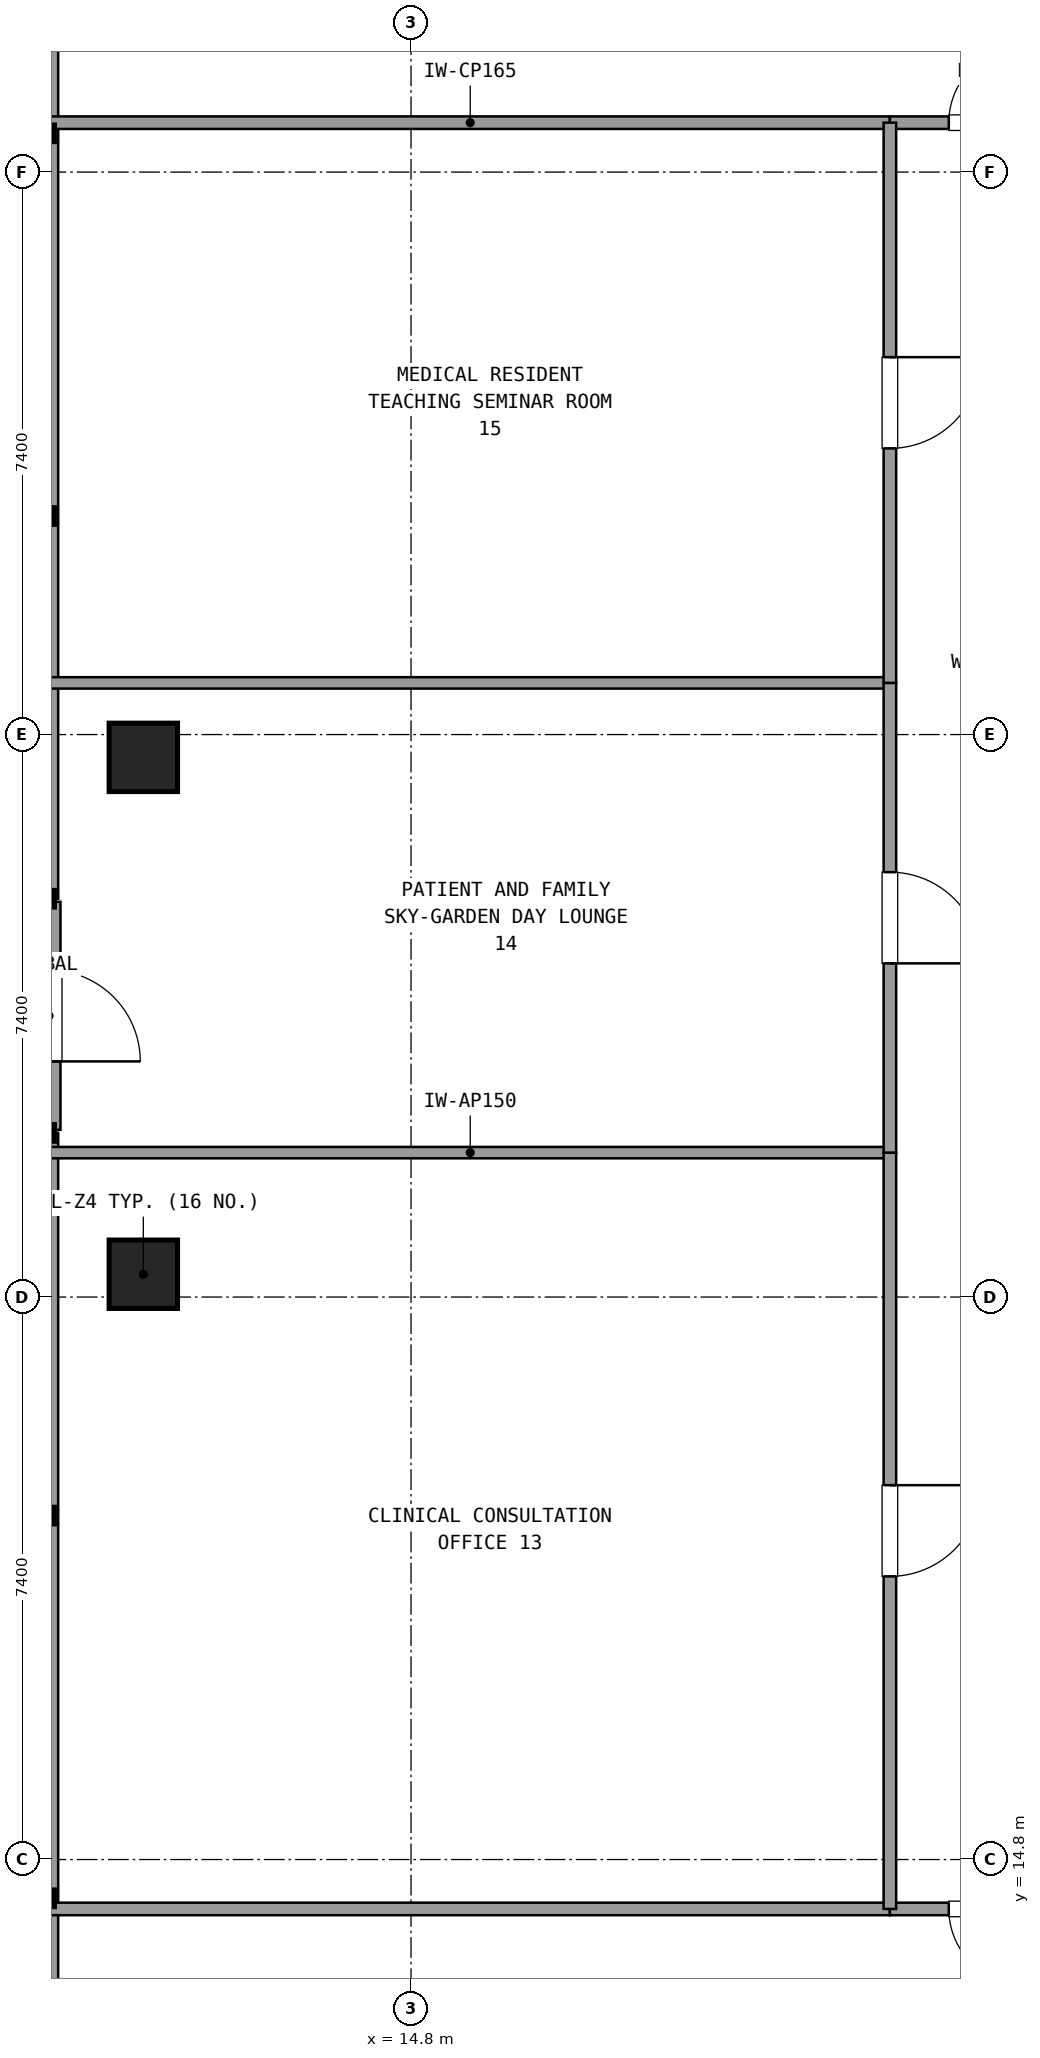
"""IFC4 building model, lengths in metres.
Left out: names, types, materials, properties, quantities, classifications, styles, units other than length and angle.
Written with IfcOpenShell. Run it as: python <this file> out.ifc"""

import sys

from ifc_helpers import new_model, si_unit, direction, frame, frame_2d, origin, origin_2d, place, context, subcontext, project, spatial, rectangle, extrude, element, fill, save


model = new_model("IFC4")
c1 = context("Model", 3, precision=1e-05, world=origin(), true_north=direction((0.0, 1.0)))
c2 = subcontext(c1, "Body", "Model", "MODEL_VIEW")
j1 = project(units=[si_unit("LENGTHUNIT", "METRE"), si_unit("PLANEANGLEUNIT", "RADIAN")], contexts=[c1])
p1 = place(None, origin())
s1 = spatial("IfcSite", under=j1, at=p1, CompositionType="ELEMENT")
p2 = place(p1, origin())
s2 = spatial("IfcBuilding", under=s1, at=p2, CompositionType="ELEMENT")
p3 = place(p2, frame((0.0, 0.0, 228.78)))
s3 = spatial("IfcBuildingStorey", under=s2, at=p3, CompositionType="ELEMENT", Elevation=228.78)
for number, where, z_axis, x_axis in (
    (1, (11.278, 22.5, 0.0), (0.0, 0.0, 1.0), (1.0, 0.0, 0.0)),
    (2, (11.278, 29.3, 0.0), (0.0, 0.0, 1.0), (1.0, 0.0, 0.0)),
):
    element("IfcColumn", number, at=place(p3, frame(where, z_axis=z_axis, x_axis=x_axis)), inside=s3, PredefinedType="COLUMN", context=c2, shape_type="SweptSolid", body=[
        extrude(rectangle(XDim=0.9, YDim=0.9, at=origin_2d()), origin(), (0.0, 0.0, 1.0), 3.6),
    ])
p4 = place(p3, frame((10.038, 27.4, 0.0), z_axis=(0.0, 0.0, 1.0), x_axis=(0.0, -1.0, 0.0)))
e3 = element("IfcWall", 3, at=p4, inside=s3, PredefinedType="SOLIDWALL", context=c2, shape_type="SweptSolid", body=[
    extrude(rectangle(XDim=3.0, YDim=0.3, at=frame_2d((1.5, 0.0))), origin(), (0.0, 0.0, 1.0), 2.67),
])
p5 = place(p4, frame((0.9, 0.0, 0.0)))
e4 = element("IfcOpeningElement", 4, at=p5, cuts=e3, PredefinedType="OPENING", context=c2, shape_type="SweptSolid", body=[
    extrude(rectangle(XDim=1.2, YDim=2.2, at=frame_2d((0.6, 1.1))), frame((0.0, 0.16, 0.0), z_axis=(0.0, -1.0, 0.0), x_axis=(1.0, 0.0, 0.0)), (0.0, 0.0, 1.0), 0.32),
])
p6 = place(p3, frame((10.038, 42.545, 0.0), z_axis=(0.0, 0.0, 1.0), x_axis=(0.0, -1.0, 0.0)))
e5 = element("IfcWall", 5, at=p6, inside=s3, PredefinedType="SOLIDWALL", context=c2, shape_type="SweptSolid", body=[
    extrude(rectangle(XDim=15.105, YDim=0.24, at=frame_2d((7.552, 0.0))), origin(), (0.0, 0.0, 1.0), 0.85),
])
p7 = place(p3, frame((10.038, 24.36, 0.0), z_axis=(0.0, 0.0, 1.0), x_axis=(0.0, -1.0, 0.0)))
e6 = element("IfcWall", 6, at=p7, inside=s3, PredefinedType="SOLIDWALL", context=c2, shape_type="SweptSolid", body=[
    extrude(rectangle(XDim=15.105, YDim=0.24, at=frame_2d((7.553, 0.0))), origin(), (0.0, 0.0, 1.0), 0.85),
])
for number, where, z_axis, x_axis in (
    (7, (10.058, 37.65, 0.0), (0.0, 0.0, 1.0), (1.0, 0.0, 0.0)),
    (8, (10.058, 14.15, 0.0), (0.0, 0.0, 1.0), (1.0, 0.0, 0.0)),
):
    element("IfcWall", number, at=place(p3, frame(where, z_axis=z_axis, x_axis=x_axis)), inside=s3, PredefinedType="PARTITIONING", context=c2, shape_type="SweptSolid", body=[
        extrude(rectangle(XDim=11.042, YDim=0.165, at=frame_2d((5.521, 0.0))), origin(), (0.0, 0.0, 1.0), 2.59),
    ])
p8 = place(p3, frame((21.1, 37.65, 0.0), z_axis=(0.0, 0.0, 1.0), x_axis=(1.0, 0.0, 0.0)))
e9 = element("IfcWall", 9, at=p8, inside=s3, PredefinedType="PARTITIONING", context=c2, shape_type="SweptSolid", body=[
    extrude(rectangle(XDim=2.55, YDim=0.165, at=frame_2d((1.275, 0.0))), origin(), (0.0, 0.0, 1.0), 2.59),
])
p9 = place(p8, frame((0.775, 0.0, 0.0)))
e10 = element("IfcOpeningElement", 10, at=p9, cuts=e9, PredefinedType="OPENING", context=c2, shape_type="SweptSolid", body=[
    extrude(rectangle(XDim=1.0, YDim=2.15, at=frame_2d((0.5, 1.075))), frame((0.0, 0.093, 0.0), z_axis=(0.0, -1.0, 0.0), x_axis=(1.0, 0.0, 0.0)), (0.0, 0.0, 1.0), 0.185),
])
p10 = place(p3, frame((21.1, 14.15, 0.0), z_axis=(0.0, 0.0, 1.0), x_axis=(1.0, 0.0, 0.0)))
e11 = element("IfcWall", 11, at=p10, inside=s3, PredefinedType="PARTITIONING", context=c2, shape_type="SweptSolid", body=[
    extrude(rectangle(XDim=2.55, YDim=0.165, at=frame_2d((1.275, 0.0))), origin(), (0.0, 0.0, 1.0), 2.59),
])
p11 = place(p10, frame((0.775, 0.0, 0.0)))
e12 = element("IfcOpeningElement", 12, at=p11, cuts=e11, PredefinedType="OPENING", context=c2, shape_type="SweptSolid", body=[
    extrude(rectangle(XDim=1.0, YDim=2.15, at=frame_2d((0.5, 1.075))), frame((0.0, 0.093, 0.0), z_axis=(0.0, -1.0, 0.0), x_axis=(1.0, 0.0, 0.0)), (0.0, 0.0, 1.0), 0.185),
])
p12 = place(p3, frame((21.1, 24.1, 0.0), z_axis=(0.0, 0.0, 1.0), x_axis=(-1.0, 0.0, 0.0)))
e13 = element("IfcWall", 13, at=p12, inside=s3, PredefinedType="PARTITIONING", context=c2, shape_type="SweptSolid", body=[
    extrude(rectangle(XDim=11.042, YDim=0.15, at=frame_2d((5.521, 0.0))), origin(), (0.0, 0.0, 1.0), 2.59),
])
p13 = place(p3, frame((21.1, 14.15, 0.0), z_axis=(0.0, 0.0, 1.0), x_axis=(0.0, 1.0, 0.0)))
e14 = element("IfcWall", 14, at=p13, inside=s3, PredefinedType="PARTITIONING", context=c2, shape_type="SweptSolid", body=[
    extrude(rectangle(XDim=9.95, YDim=0.165, at=frame_2d((4.975, 0.0))), origin(), (0.0, 0.0, 1.0), 2.59),
])
p14 = place(p13, frame((4.375, 0.0, 0.0)))
e15 = element("IfcOpeningElement", 15, at=p14, cuts=e14, PredefinedType="OPENING", context=c2, shape_type="SweptSolid", body=[
    extrude(rectangle(XDim=1.2, YDim=2.15, at=frame_2d((0.6, 1.075))), frame((0.0, 0.093, 0.0), z_axis=(0.0, -1.0, 0.0), x_axis=(1.0, 0.0, 0.0)), (0.0, 0.0, 1.0), 0.185),
])
p15 = place(p3, frame((21.1, 30.28, 0.0), z_axis=(0.0, 0.0, 1.0), x_axis=(-1.0, 0.0, 0.0)))
e16 = element("IfcWall", 16, at=p15, inside=s3, PredefinedType="PARTITIONING", context=c2, shape_type="SweptSolid", body=[
    extrude(rectangle(XDim=11.042, YDim=0.15, at=frame_2d((5.521, 0.0))), origin(), (0.0, 0.0, 1.0), 2.59),
])
p16 = place(p3, frame((21.1, 24.1, 0.0), z_axis=(0.0, 0.0, 1.0), x_axis=(0.0, 1.0, 0.0)))
e17 = element("IfcWall", 17, at=p16, inside=s3, PredefinedType="PARTITIONING", context=c2, shape_type="SweptSolid", body=[
    extrude(rectangle(XDim=6.18, YDim=0.165, at=frame_2d((3.09, 0.0))), origin(), (0.0, 0.0, 1.0), 2.59),
])
p17 = place(p16, frame((2.49, 0.0, 0.0)))
e18 = element("IfcOpeningElement", 18, at=p17, cuts=e17, PredefinedType="OPENING", context=c2, shape_type="SweptSolid", body=[
    extrude(rectangle(XDim=1.2, YDim=2.15, at=frame_2d((0.6, 1.075))), frame((0.0, 0.093, 0.0), z_axis=(0.0, -1.0, 0.0), x_axis=(1.0, 0.0, 0.0)), (0.0, 0.0, 1.0), 0.185),
])
p18 = place(p3, frame((21.1, 30.28, 0.0), z_axis=(0.0, 0.0, 1.0), x_axis=(0.0, 1.0, 0.0)))
e19 = element("IfcWall", 19, at=p18, inside=s3, PredefinedType="PARTITIONING", context=c2, shape_type="SweptSolid", body=[
    extrude(rectangle(XDim=7.37, YDim=0.165, at=frame_2d((3.685, 0.0))), origin(), (0.0, 0.0, 1.0), 2.59),
])
p19 = place(p18, frame((3.085, 0.0, 0.0)))
e20 = element("IfcOpeningElement", 20, at=p19, cuts=e19, PredefinedType="OPENING", context=c2, shape_type="SweptSolid", body=[
    extrude(rectangle(XDim=1.2, YDim=2.15, at=frame_2d((0.6, 1.075))), frame((0.0, 0.093, 0.0), z_axis=(0.0, -1.0, 0.0), x_axis=(1.0, 0.0, 0.0)), (0.0, 0.0, 1.0), 0.185),
])
p20 = place(p9, origin())
e21 = element("IfcDoor", 21, at=p20, inside=s3, OperationType="SINGLE_SWING_RIGHT", PredefinedType="DOOR", context=c2, shape_type="SweptSolid", body=[
    extrude(rectangle(XDim=1.0, YDim=2.15, at=frame_2d((0.5, 1.075))), frame((0.0, 0.025, 0.0), z_axis=(0.0, -1.0, 0.0), x_axis=(1.0, 0.0, 0.0)), (0.0, 0.0, 1.0), 0.05),
])
fill(e10, e21)
p21 = place(p11, frame((1.0, 0.0, 0.0), z_axis=(0.0, 0.0, 1.0), x_axis=(-1.0, 0.0, 0.0)))
e22 = element("IfcDoor", 22, at=p21, inside=s3, OperationType="SINGLE_SWING_RIGHT", PredefinedType="DOOR", context=c2, shape_type="SweptSolid", body=[
    extrude(rectangle(XDim=1.0, YDim=2.15, at=frame_2d((0.5, 1.075))), frame((0.0, 0.025, 0.0), z_axis=(0.0, -1.0, 0.0), x_axis=(1.0, 0.0, 0.0)), (0.0, 0.0, 1.0), 0.05),
])
fill(e12, e22)
p22 = place(p14, frame((1.2, 0.0, 0.0), z_axis=(0.0, 0.0, 1.0), x_axis=(-1.0, 0.0, 0.0)))
e23 = element("IfcDoor", 23, at=p22, inside=s3, OperationType="SINGLE_SWING_RIGHT", PredefinedType="DOOR", context=c2, shape_type="SweptSolid", body=[
    extrude(rectangle(XDim=1.2, YDim=2.15, at=frame_2d((0.6, 1.075))), frame((0.0, 0.025, 0.0), z_axis=(0.0, -1.0, 0.0), x_axis=(1.0, 0.0, 0.0)), (0.0, 0.0, 1.0), 0.05),
])
fill(e15, e23)
p23 = place(p17, frame((1.2, 0.0, 0.0), z_axis=(0.0, 0.0, 1.0), x_axis=(-1.0, 0.0, 0.0)))
e24 = element("IfcDoor", 24, at=p23, inside=s3, OperationType="SINGLE_SWING_LEFT", PredefinedType="DOOR", context=c2, shape_type="SweptSolid", body=[
    extrude(rectangle(XDim=1.2, YDim=2.15, at=frame_2d((0.6, 1.075))), frame((0.0, 0.025, 0.0), z_axis=(0.0, -1.0, 0.0), x_axis=(1.0, 0.0, 0.0)), (0.0, 0.0, 1.0), 0.05),
])
fill(e18, e24)
p24 = place(p19, frame((1.2, 0.0, 0.0), z_axis=(0.0, 0.0, 1.0), x_axis=(-1.0, 0.0, 0.0)))
e25 = element("IfcDoor", 25, at=p24, inside=s3, OperationType="SINGLE_SWING_RIGHT", PredefinedType="DOOR", context=c2, shape_type="SweptSolid", body=[
    extrude(rectangle(XDim=1.2, YDim=2.15, at=frame_2d((0.6, 1.075))), frame((0.0, 0.025, 0.0), z_axis=(0.0, -1.0, 0.0), x_axis=(1.0, 0.0, 0.0)), (0.0, 0.0, 1.0), 0.05),
])
fill(e20, e25)
save(model, sys.argv[1])
